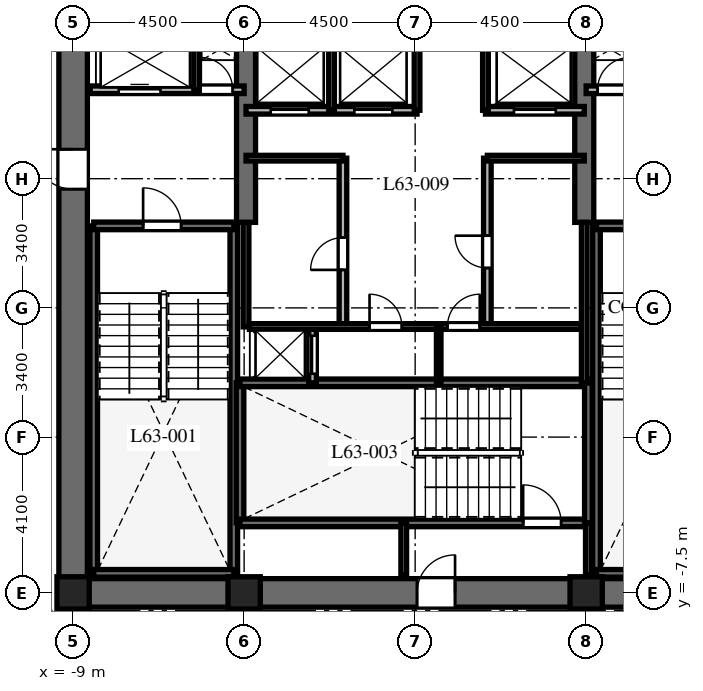
"""IFC4 building model, lengths in metres.
Left out: names, types, materials, properties, quantities, classifications, styles, units other than length and angle.
Written with IfcOpenShell. Run it as: python <this file> out.ifc"""

import sys

from ifc_helpers import new_model, si_unit, direction, frame, frame_2d, origin, origin_2d, place, context, subcontext, project, spatial, rectangle, extrude, element, fill, save


model = new_model("IFC4")
c1 = context("Model", 3, precision=1e-05, world=origin(), true_north=direction((0.0, 1.0)))
c2 = subcontext(c1, "Body", "Model", "MODEL_VIEW")
j1 = project(units=[si_unit("LENGTHUNIT", "METRE"), si_unit("PLANEANGLEUNIT", "RADIAN")], contexts=[c1])
p1 = place(None, origin())
s1 = spatial("IfcSite", under=j1, at=p1, CompositionType="ELEMENT")
p2 = place(p1, origin())
s2 = spatial("IfcBuilding", under=s1, at=p2, CompositionType="ELEMENT")
p3 = place(p2, frame((0.0, 0.0, 252.1)))
s3 = spatial("IfcBuildingStorey", under=s2, at=p3, CompositionType="ELEMENT", Elevation=252.1)
p4 = place(p3, frame((-9.375, -7.5, 0.0), z_axis=(0.0, 0.0, 1.0), x_axis=(1.0, 0.0, 0.0)))
e1 = element("IfcWall", 1, at=p4, inside=s3, PredefinedType="SHEAR", context=c2, shape_type="SweptSolid", body=[
    extrude(rectangle(XDim=18.75, YDim=0.75, at=frame_2d((9.375, 0.0))), origin(), (0.0, 0.0, 1.0), 3.8),
])
p5 = place(p4, frame((9.425, 0.0, 0.0)))
e2 = element("IfcOpeningElement", 2, at=p5, cuts=e1, PredefinedType="OPENING", context=c2, shape_type="SweptSolid", body=[
    extrude(rectangle(XDim=1.0, YDim=2.15, at=frame_2d((0.5, 1.075))), frame((0.0, 0.385, 0.0), z_axis=(0.0, -1.0, 0.0), x_axis=(1.0, 0.0, 0.0)), (0.0, 0.0, 1.0), 0.77),
])
p6 = place(p3, frame((-9.0, -7.125, 0.0), z_axis=(0.0, 0.0, 1.0), x_axis=(0.0, 1.0, 0.0)))
e3 = element("IfcWall", 3, at=p6, inside=s3, PredefinedType="SHEAR", context=c2, shape_type="SweptSolid", body=[
    extrude(rectangle(XDim=14.25, YDim=0.75, at=frame_2d((7.125, 0.0))), origin(), (0.0, 0.0, 1.0), 3.8),
])
p7 = place(p6, frame((10.25, 0.0, 0.0)))
e4 = element("IfcOpeningElement", 4, at=p7, cuts=e3, PredefinedType="OPENING", context=c2, shape_type="SweptSolid", body=[
    extrude(rectangle(XDim=1.05, YDim=2.15, at=frame_2d((0.525, 1.075))), frame((0.0, 0.385, 0.0), z_axis=(0.0, -1.0, 0.0), x_axis=(1.0, 0.0, 0.0)), (0.0, 0.0, 1.0), 0.77),
])
for number, where, z_axis, x_axis in (
    (5, (-4.45, 2.25, 0.0), (0.0, 0.0, 1.0), (0.0, 1.0, 0.0)),
    (6, (4.45, 2.25, 0.0), (0.0, 0.0, 1.0), (0.0, 1.0, 0.0)),
):
    element("IfcWall", number, at=place(p3, frame(where, z_axis=z_axis, x_axis=x_axis)), inside=s3, PredefinedType="SHEAR", context=c2, shape_type="SweptSolid", body=[
        extrude(rectangle(XDim=4.875, YDim=0.5, at=frame_2d((2.438, 0.0))), origin(), (0.0, 0.0, 1.0), 3.8),
    ])
for number, where, z_axis, x_axis in (
    (7, (-8.458, -6.985, 0.0), (0.0, 0.0, 1.0), (0.0, 1.0, 0.0)),
    (8, (-4.772, -6.985, 0.0), (0.0, 0.0, 1.0), (0.0, 1.0, 0.0)),
):
    element("IfcWall", number, at=place(p3, frame(where, z_axis=z_axis, x_axis=x_axis)), inside=s3, PredefinedType="SHEAR", context=c2, shape_type="SweptSolid", body=[
        extrude(rectangle(XDim=9.143, YDim=0.2, at=frame_2d((4.572, 0.0))), origin(), (0.0, 0.0, 1.0), 3.8),
    ])
p8 = place(p3, frame((-8.458, -6.985, 0.0), z_axis=(0.0, 0.0, 1.0), x_axis=(1.0, 0.0, 0.0)))
e9 = element("IfcWall", 9, at=p8, inside=s3, PredefinedType="SHEAR", context=c2, shape_type="SweptSolid", body=[
    extrude(rectangle(XDim=3.686, YDim=0.2, at=frame_2d((1.843, 0.0))), origin(), (0.0, 0.0, 1.0), 3.8),
])
p9 = place(p3, frame((-8.458, 2.158, 0.0), z_axis=(0.0, 0.0, 1.0), x_axis=(1.0, 0.0, 0.0)))
e10 = element("IfcWall", 10, at=p9, inside=s3, PredefinedType="SHEAR", context=c2, shape_type="SweptSolid", body=[
    extrude(rectangle(XDim=3.686, YDim=0.2, at=frame_2d((1.843, 0.0))), origin(), (0.0, 0.0, 1.0), 3.8),
])
p10 = place(p9, frame((1.3, 0.0, 0.0)))
e11 = element("IfcOpeningElement", 11, at=p10, cuts=e10, PredefinedType="OPENING", context=c2, shape_type="SweptSolid", body=[
    extrude(rectangle(XDim=1.0, YDim=2.15, at=frame_2d((0.5, 1.075))), frame((0.0, 0.11, 0.0), z_axis=(0.0, -1.0, 0.0), x_axis=(1.0, 0.0, 0.0)), (0.0, 0.0, 1.0), 0.22),
])
p11 = place(p3, frame((4.772, -6.985, 0.0), z_axis=(0.0, 0.0, 1.0), x_axis=(0.0, 1.0, 0.0)))
e12 = element("IfcWall", 12, at=p11, inside=s3, PredefinedType="SHEAR", context=c2, shape_type="SweptSolid", body=[
    extrude(rectangle(XDim=9.143, YDim=0.2, at=frame_2d((4.572, 0.0))), origin(), (0.0, 0.0, 1.0), 3.8),
])
p12 = place(p3, frame((4.772, -6.985, 0.0), z_axis=(0.0, 0.0, 1.0), x_axis=(1.0, 0.0, 0.0)))
e13 = element("IfcWall", 13, at=p12, inside=s3, PredefinedType="SHEAR", context=c2, shape_type="SweptSolid", body=[
    extrude(rectangle(XDim=3.686, YDim=0.2, at=frame_2d((1.843, 0.0))), origin(), (0.0, 0.0, 1.0), 3.8),
])
p13 = place(p3, frame((4.772, 2.158, 0.0), z_axis=(0.0, 0.0, 1.0), x_axis=(1.0, 0.0, 0.0)))
e14 = element("IfcWall", 14, at=p13, inside=s3, PredefinedType="SHEAR", context=c2, shape_type="SweptSolid", body=[
    extrude(rectangle(XDim=3.686, YDim=0.2, at=frame_2d((1.843, 0.0))), origin(), (0.0, 0.0, 1.0), 3.8),
])
p14 = place(p13, frame((1.35, 0.0, 0.0)))
e15 = element("IfcOpeningElement", 15, at=p14, cuts=e14, PredefinedType="OPENING", context=c2, shape_type="SweptSolid", body=[
    extrude(rectangle(XDim=1.0, YDim=2.15, at=frame_2d((0.5, 1.075))), frame((0.0, 0.11, 0.0), z_axis=(0.0, -1.0, 0.0), x_axis=(1.0, 0.0, 0.0)), (0.0, 0.0, 1.0), 0.22),
])
p15 = place(p3, frame((-4.608, -5.658, 0.0), z_axis=(0.0, 0.0, 1.0), x_axis=(0.0, 1.0, 0.0)))
e16 = element("IfcWall", 16, at=p15, inside=s3, PredefinedType="SHEAR", context=c2, shape_type="SweptSolid", body=[
    extrude(rectangle(XDim=3.686, YDim=0.2, at=frame_2d((1.843, 0.0))), origin(), (0.0, 0.0, 1.0), 3.8),
])
p16 = place(p3, frame((-4.608, -5.658, 0.0), z_axis=(0.0, 0.0, 1.0), x_axis=(1.0, 0.0, 0.0)))
e17 = element("IfcWall", 17, at=p16, inside=s3, PredefinedType="SHEAR", context=c2, shape_type="SweptSolid", body=[
    extrude(rectangle(XDim=9.166, YDim=0.2, at=frame_2d((4.583, 0.0))), origin(), (0.0, 0.0, 1.0), 3.8),
])
p17 = place(p16, frame((7.45, 0.0, 0.0)))
e18 = element("IfcOpeningElement", 18, at=p17, cuts=e17, PredefinedType="OPENING", context=c2, shape_type="SweptSolid", body=[
    extrude(rectangle(XDim=1.0, YDim=2.15, at=frame_2d((0.5, 1.075))), frame((0.0, 0.11, 0.0), z_axis=(0.0, -1.0, 0.0), x_axis=(1.0, 0.0, 0.0)), (0.0, 0.0, 1.0), 0.22),
])
p18 = place(p3, frame((-4.608, -1.972, 0.0), z_axis=(0.0, 0.0, 1.0), x_axis=(1.0, 0.0, 0.0)))
e19 = element("IfcWall", 19, at=p18, inside=s3, PredefinedType="SHEAR", context=c2, shape_type="SweptSolid", body=[
    extrude(rectangle(XDim=9.166, YDim=0.2, at=frame_2d((4.583, 0.0))), origin(), (0.0, 0.0, 1.0), 3.8),
])
p19 = place(p3, frame((4.558, -5.658, 0.0), z_axis=(0.0, 0.0, 1.0), x_axis=(0.0, 1.0, 0.0)))
e20 = element("IfcWall", 20, at=p19, inside=s3, PredefinedType="SHEAR", context=c2, shape_type="SweptSolid", body=[
    extrude(rectangle(XDim=3.686, YDim=0.2, at=frame_2d((1.843, 0.0))), origin(), (0.0, 0.0, 1.0), 3.8),
])
for number, where, z_axis, x_axis in (
    (21, (-9.0, -7.5, 0.0), (0.0, 0.0, 1.0), (1.0, 0.0, 0.0)),
    (22, (-4.5, -7.5, 0.0), (0.0, 0.0, 1.0), (1.0, 0.0, 0.0)),
    (23, (4.5, -7.5, 0.0), (0.0, 0.0, 1.0), (1.0, 0.0, 0.0)),
):
    element("IfcColumn", number, at=place(p3, frame(where, z_axis=z_axis, x_axis=x_axis)), inside=s3, PredefinedType="COLUMN", context=c2, shape_type="SweptSolid", body=[
        extrude(rectangle(XDim=0.85, YDim=0.85, at=origin_2d()), origin(), (0.0, 0.0, 1.0), 3.8),
    ])
for number, where, z_axis, x_axis in (
    (24, (-0.3, -7.02, 0.0), (0.0, 0.0, 1.0), (0.0, 1.0, 0.0)),
    (25, (4.558, -7.02, 0.0), (0.0, 0.0, 1.0), (0.0, 1.0, 0.0)),
):
    element("IfcWall", number, at=place(p3, frame(where, z_axis=z_axis, x_axis=x_axis)), inside=s3, PredefinedType="PARTITIONING", context=c2, shape_type="SweptSolid", body=[
        extrude(rectangle(XDim=1.362, YDim=0.15, at=frame_2d((0.681, 0.0))), origin(), (0.0, 0.0, 1.0), 3.48),
    ])
p20 = place(p3, frame((-8.55, 5.74, 0.0), z_axis=(0.0, 0.0, 1.0), x_axis=(1.0, 0.0, 0.0)))
e26 = element("IfcWall", 26, at=p20, inside=s3, PredefinedType="PARTITIONING", context=c2, shape_type="SweptSolid", body=[
    extrude(rectangle(XDim=4.05, YDim=0.2, at=frame_2d((2.025, 0.0))), origin(), (0.0, 0.0, 1.0), 3.48),
])
p21 = place(p20, frame((0.75, 0.0, 0.0)))
e27 = element("IfcOpeningElement", 27, at=p21, cuts=e26, PredefinedType="OPENING", context=c2, shape_type="SweptSolid", body=[
    extrude(rectangle(XDim=1.1, YDim=2.2, at=frame_2d((0.55, 1.1))), frame((0.0, 0.11, 0.0), z_axis=(0.0, -1.0, 0.0), x_axis=(1.0, 0.0, 0.0)), (0.0, 0.0, 1.0), 0.22),
])
p22 = place(p20, frame((2.9, 0.0, 0.0)))
e28 = element("IfcOpeningElement", 28, at=p22, cuts=e26, PredefinedType="OPENING", context=c2, shape_type="SweptSolid", body=[
    extrude(rectangle(XDim=0.85, YDim=2.03, at=frame_2d((0.425, 1.015))), frame((0.0, 0.11, 0.0), z_axis=(0.0, -1.0, 0.0), x_axis=(1.0, 0.0, 0.0)), (0.0, 0.0, 1.0), 0.22),
])
p23 = place(p3, frame((-5.75, 5.74, 0.0), z_axis=(0.0, 0.0, 1.0), x_axis=(0.0, 1.0, 0.0)))
e29 = element("IfcWall", 29, at=p23, inside=s3, PredefinedType="PARTITIONING", context=c2, shape_type="SweptSolid", body=[
    extrude(rectangle(XDim=1.41, YDim=0.15, at=frame_2d((0.705, 0.0))), origin(), (0.0, 0.0, 1.0), 3.48),
])
p24 = place(p3, frame((4.5, 5.74, 0.0), z_axis=(0.0, 0.0, 1.0), x_axis=(1.0, 0.0, 0.0)))
e30 = element("IfcWall", 30, at=p24, inside=s3, PredefinedType="PARTITIONING", context=c2, shape_type="SweptSolid", body=[
    extrude(rectangle(XDim=4.05, YDim=0.2, at=frame_2d((2.025, 0.0))), origin(), (0.0, 0.0, 1.0), 3.48),
])
p25 = place(p24, frame((0.3, 0.0, 0.0)))
e31 = element("IfcOpeningElement", 31, at=p25, cuts=e30, PredefinedType="OPENING", context=c2, shape_type="SweptSolid", body=[
    extrude(rectangle(XDim=0.85, YDim=2.03, at=frame_2d((0.425, 1.015))), frame((0.0, 0.11, 0.0), z_axis=(0.0, -1.0, 0.0), x_axis=(1.0, 0.0, 0.0)), (0.0, 0.0, 1.0), 0.22),
])
p26 = place(p24, frame((2.15, 0.0, 0.0)))
e32 = element("IfcOpeningElement", 32, at=p26, cuts=e30, PredefinedType="OPENING", context=c2, shape_type="SweptSolid", body=[
    extrude(rectangle(XDim=1.1, YDim=2.2, at=frame_2d((0.55, 1.1))), frame((0.0, 0.11, 0.0), z_axis=(0.0, -1.0, 0.0), x_axis=(1.0, 0.0, 0.0)), (0.0, 0.0, 1.0), 0.22),
])
p27 = place(p3, frame((-2.7, -1.972, 0.0), z_axis=(0.0, 0.0, 1.0), x_axis=(0.0, 1.0, 0.0)))
e33 = element("IfcWall", 33, at=p27, inside=s3, PredefinedType="PARTITIONING", context=c2, shape_type="SweptSolid", body=[
    extrude(rectangle(XDim=1.472, YDim=0.2, at=frame_2d((0.736, 0.0))), origin(), (0.0, 0.0, 1.0), 3.48),
])
p28 = place(p27, frame((0.24, 0.0, 0.0)))
e34 = element("IfcOpeningElement", 34, at=p28, cuts=e33, PredefinedType="OPENING", context=c2, shape_type="SweptSolid", body=[
    extrude(rectangle(XDim=1.0, YDim=2.2, at=frame_2d((0.5, 1.1))), frame((0.0, 0.11, 0.0), z_axis=(0.0, -1.0, 0.0), x_axis=(1.0, 0.0, 0.0)), (0.0, 0.0, 1.0), 0.22),
])
p29 = place(p3, frame((-4.45, 5.2, 0.0), z_axis=(0.0, 0.0, 1.0), x_axis=(1.0, 0.0, 0.0)))
e35 = element("IfcWall", 35, at=p29, inside=s3, PredefinedType="PARTITIONING", context=c2, shape_type="SweptSolid", body=[
    extrude(rectangle(XDim=4.5, YDim=0.2, at=frame_2d((2.25, 0.0))), origin(), (0.0, 0.0, 1.0), 3.48),
])
p30 = place(p29, frame((0.65, 0.0, 0.0)))
e36 = element("IfcOpeningElement", 36, at=p30, cuts=e35, PredefinedType="OPENING", context=c2, shape_type="SweptSolid", body=[
    extrude(rectangle(XDim=1.0, YDim=2.2, at=frame_2d((0.5, 1.1))), frame((0.0, 0.11, 0.0), z_axis=(0.0, -1.0, 0.0), x_axis=(1.0, 0.0, 0.0)), (0.0, 0.0, 1.0), 0.22),
])
p31 = place(p29, frame((2.85, 0.0, 0.0)))
e37 = element("IfcOpeningElement", 37, at=p31, cuts=e35, PredefinedType="OPENING", context=c2, shape_type="SweptSolid", body=[
    extrude(rectangle(XDim=1.0, YDim=2.2, at=frame_2d((0.5, 1.1))), frame((0.0, 0.11, 0.0), z_axis=(0.0, -1.0, 0.0), x_axis=(1.0, 0.0, 0.0)), (0.0, 0.0, 1.0), 0.22),
])
p32 = place(p3, frame((1.85, 5.2, 0.0), z_axis=(0.0, 0.0, 1.0), x_axis=(1.0, 0.0, 0.0)))
e38 = element("IfcWall", 38, at=p32, inside=s3, PredefinedType="PARTITIONING", context=c2, shape_type="SweptSolid", body=[
    extrude(rectangle(XDim=2.6, YDim=0.2, at=frame_2d((1.3, 0.0))), origin(), (0.0, 0.0, 1.0), 3.48),
])
p33 = place(p32, frame((0.75, 0.0, 0.0)))
e39 = element("IfcOpeningElement", 39, at=p33, cuts=e38, PredefinedType="OPENING", context=c2, shape_type="SweptSolid", body=[
    extrude(rectangle(XDim=1.1, YDim=2.2, at=frame_2d((0.55, 1.1))), frame((0.0, 0.11, 0.0), z_axis=(0.0, -1.0, 0.0), x_axis=(1.0, 0.0, 0.0)), (0.0, 0.0, 1.0), 0.22),
])
p34 = place(p3, frame((-2.2, 5.2, 0.0), z_axis=(0.0, 0.0, 1.0), x_axis=(0.0, 1.0, 0.0)))
e40 = element("IfcWall", 40, at=p34, inside=s3, PredefinedType="PARTITIONING", context=c2, shape_type="SweptSolid", body=[
    extrude(rectangle(XDim=1.85, YDim=0.15, at=frame_2d((0.925, 0.0))), origin(), (0.0, 0.0, 1.0), 3.48),
])
for number, where, z_axis, x_axis in (
    (41, (0.05, 5.2, 0.0), (0.0, 0.0, 1.0), (0.0, 1.0, 0.0)),
    (42, (1.85, 5.2, 0.0), (0.0, 0.0, 1.0), (0.0, 1.0, 0.0)),
):
    element("IfcWall", number, at=place(p3, frame(where, z_axis=z_axis, x_axis=x_axis)), inside=s3, PredefinedType="PARTITIONING", context=c2, shape_type="SweptSolid", body=[
        extrude(rectangle(XDim=1.95, YDim=0.15, at=frame_2d((0.975, 0.0))), origin(), (0.0, 0.0, 1.0), 3.48),
    ])
p35 = place(p3, frame((-4.45, -0.5, 0.0), z_axis=(0.0, 0.0, 1.0), x_axis=(0.0, 1.0, 0.0)))
e43 = element("IfcWall", 43, at=p35, inside=s3, PredefinedType="PARTITIONING", context=c2, shape_type="SweptSolid", body=[
    extrude(rectangle(XDim=2.75, YDim=0.15, at=frame_2d((1.375, 0.0))), origin(), (0.0, 0.0, 1.0), 3.48),
])
p36 = place(p3, frame((4.45, -1.972, 0.0), z_axis=(0.0, 0.0, 1.0), x_axis=(0.0, 1.0, 0.0)))
e44 = element("IfcWall", 44, at=p36, inside=s3, PredefinedType="PARTITIONING", context=c2, shape_type="SweptSolid", body=[
    extrude(rectangle(XDim=4.222, YDim=0.15, at=frame_2d((2.111, 0.0))), origin(), (0.0, 0.0, 1.0), 3.48),
])
p37 = place(p3, frame((-1.9, -0.5, 0.0), z_axis=(0.0, 0.0, 1.0), x_axis=(0.0, 1.0, 0.0)))
e45 = element("IfcWall", 45, at=p37, inside=s3, PredefinedType="PARTITIONING", context=c2, shape_type="SweptSolid", body=[
    extrude(rectangle(XDim=4.44, YDim=0.2, at=frame_2d((2.22, 0.0))), origin(), (0.0, 0.0, 1.0), 3.48),
])
p38 = place(p37, frame((1.5, 0.0, 0.0)))
e46 = element("IfcOpeningElement", 46, at=p38, cuts=e45, PredefinedType="OPENING", context=c2, shape_type="SweptSolid", body=[
    extrude(rectangle(XDim=0.85, YDim=2.03, at=frame_2d((0.425, 1.015))), frame((0.0, 0.11, 0.0), z_axis=(0.0, -1.0, 0.0), x_axis=(1.0, 0.0, 0.0)), (0.0, 0.0, 1.0), 0.22),
])
p39 = place(p3, frame((-4.45, 3.94, 0.0), z_axis=(0.0, 0.0, 1.0), x_axis=(1.0, 0.0, 0.0)))
e47 = element("IfcWall", 47, at=p39, inside=s3, PredefinedType="PARTITIONING", context=c2, shape_type="SweptSolid", body=[
    extrude(rectangle(XDim=2.55, YDim=0.15, at=frame_2d((1.275, 0.0))), origin(), (0.0, 0.0, 1.0), 3.48),
])
p40 = place(p3, frame((1.9, -0.5, 0.0), z_axis=(0.0, 0.0, 1.0), x_axis=(0.0, 1.0, 0.0)))
e48 = element("IfcWall", 48, at=p40, inside=s3, PredefinedType="PARTITIONING", context=c2, shape_type="SweptSolid", body=[
    extrude(rectangle(XDim=4.44, YDim=0.2, at=frame_2d((2.22, 0.0))), origin(), (0.0, 0.0, 1.0), 3.48),
])
p41 = place(p40, frame((1.55, 0.0, 0.0)))
e49 = element("IfcOpeningElement", 49, at=p41, cuts=e48, PredefinedType="OPENING", context=c2, shape_type="SweptSolid", body=[
    extrude(rectangle(XDim=0.85, YDim=2.03, at=frame_2d((0.425, 1.015))), frame((0.0, 0.11, 0.0), z_axis=(0.0, -1.0, 0.0), x_axis=(1.0, 0.0, 0.0)), (0.0, 0.0, 1.0), 0.22),
])
p42 = place(p3, frame((1.9, 3.94, 0.0), z_axis=(0.0, 0.0, 1.0), x_axis=(1.0, 0.0, 0.0)))
e50 = element("IfcWall", 50, at=p42, inside=s3, PredefinedType="PARTITIONING", context=c2, shape_type="SweptSolid", body=[
    extrude(rectangle(XDim=2.55, YDim=0.15, at=frame_2d((1.275, 0.0))), origin(), (0.0, 0.0, 1.0), 3.48),
])
p43 = place(p3, frame((-4.36, -0.49, 0.0), z_axis=(0.0, 0.0, 1.0), x_axis=(1.0, 0.0, 0.0)))
e51 = element("IfcWall", 51, at=p43, inside=s3, PredefinedType="PARTITIONING", context=c2, shape_type="SweptSolid", body=[
    extrude(rectangle(XDim=8.72, YDim=0.15, at=frame_2d((4.36, 0.0))), origin(), (0.0, 0.0, 1.0), 3.48),
])
p44 = place(p43, frame((3.16, 0.0, 0.0)))
e52 = element("IfcOpeningElement", 52, at=p44, cuts=e51, PredefinedType="OPENING", context=c2, shape_type="SweptSolid", body=[
    extrude(rectangle(XDim=0.85, YDim=2.03, at=frame_2d((0.425, 1.015))), frame((0.0, 0.085, 0.0), z_axis=(0.0, -1.0, 0.0), x_axis=(1.0, 0.0, 0.0)), (0.0, 0.0, 1.0), 0.17),
])
p45 = place(p43, frame((5.21, 0.0, 0.0)))
e53 = element("IfcOpeningElement", 53, at=p45, cuts=e51, PredefinedType="OPENING", context=c2, shape_type="SweptSolid", body=[
    extrude(rectangle(XDim=0.85, YDim=2.03, at=frame_2d((0.425, 1.015))), frame((0.0, 0.085, 0.0), z_axis=(0.0, -1.0, 0.0), x_axis=(1.0, 0.0, 0.0)), (0.0, 0.0, 1.0), 0.17),
])
p46 = place(p3, frame((0.62, -1.972, 0.0), z_axis=(0.0, 0.0, 1.0), x_axis=(0.0, 1.0, 0.0)))
e54 = element("IfcWall", 54, at=p46, inside=s3, PredefinedType="PARTITIONING", context=c2, shape_type="SweptSolid", body=[
    extrude(rectangle(XDim=1.472, YDim=0.12, at=frame_2d((0.736, 0.0))), origin(), (0.0, 0.0, 1.0), 3.48),
])
p47 = place(p10, origin())
e55 = element("IfcDoor", 55, at=p47, inside=s3, OperationType="SINGLE_SWING_LEFT", PredefinedType="DOOR", context=c2, shape_type="SweptSolid", body=[
    extrude(rectangle(XDim=1.0, YDim=2.15, at=frame_2d((0.5, 1.075))), frame((0.0, 0.025, 0.0), z_axis=(0.0, -1.0, 0.0), x_axis=(1.0, 0.0, 0.0)), (0.0, 0.0, 1.0), 0.05),
])
fill(e11, e55)
p48 = place(p17, origin())
e56 = element("IfcDoor", 56, at=p48, inside=s3, OperationType="SINGLE_SWING_LEFT", PredefinedType="DOOR", context=c2, shape_type="SweptSolid", body=[
    extrude(rectangle(XDim=1.0, YDim=2.15, at=frame_2d((0.5, 1.075))), frame((0.0, 0.025, 0.0), z_axis=(0.0, -1.0, 0.0), x_axis=(1.0, 0.0, 0.0)), (0.0, 0.0, 1.0), 0.05),
])
fill(e18, e56)
p49 = place(p5, origin())
e57 = element("IfcDoor", 57, at=p49, inside=s3, OperationType="SINGLE_SWING_RIGHT", PredefinedType="DOOR", context=c2, shape_type="SweptSolid", body=[
    extrude(rectangle(XDim=1.0, YDim=2.15, at=frame_2d((0.5, 1.075))), frame((0.0, 0.025, 0.0), z_axis=(0.0, -1.0, 0.0), x_axis=(1.0, 0.0, 0.0)), (0.0, 0.0, 1.0), 0.05),
])
fill(e2, e57)
p50 = place(p7, origin())
e58 = element("IfcDoor", 58, at=p50, inside=s3, OperationType="SINGLE_SWING_RIGHT", PredefinedType="DOOR", context=c2, shape_type="SweptSolid", body=[
    extrude(rectangle(XDim=1.05, YDim=2.15, at=frame_2d((0.525, 1.075))), frame((0.0, 0.025, 0.0), z_axis=(0.0, -1.0, 0.0), x_axis=(1.0, 0.0, 0.0)), (0.0, 0.0, 1.0), 0.05),
])
fill(e4, e58)
p51 = place(p21, origin())
e59 = element("IfcDoor", 59, at=p51, inside=s3, OperationType="SLIDING_TO_LEFT", PredefinedType="DOOR", context=c2, shape_type="SweptSolid", body=[
    extrude(rectangle(XDim=1.1, YDim=2.2, at=frame_2d((0.55, 1.1))), frame((0.0, 0.025, 0.0), z_axis=(0.0, -1.0, 0.0), x_axis=(1.0, 0.0, 0.0)), (0.0, 0.0, 1.0), 0.05),
])
fill(e27, e59)
p52 = place(p22, origin())
e60 = element("IfcDoor", 60, at=p52, inside=s3, OperationType="SINGLE_SWING_LEFT", PredefinedType="DOOR", context=c2, shape_type="SweptSolid", body=[
    extrude(rectangle(XDim=0.85, YDim=2.03, at=frame_2d((0.425, 1.015))), frame((0.0, 0.025, 0.0), z_axis=(0.0, -1.0, 0.0), x_axis=(1.0, 0.0, 0.0)), (0.0, 0.0, 1.0), 0.05),
])
fill(e28, e60)
p53 = place(p25, origin())
e61 = element("IfcDoor", 61, at=p53, inside=s3, OperationType="SINGLE_SWING_RIGHT", PredefinedType="DOOR", context=c2, shape_type="SweptSolid", body=[
    extrude(rectangle(XDim=0.85, YDim=2.03, at=frame_2d((0.425, 1.015))), frame((0.0, 0.025, 0.0), z_axis=(0.0, -1.0, 0.0), x_axis=(1.0, 0.0, 0.0)), (0.0, 0.0, 1.0), 0.05),
])
fill(e31, e61)
p54 = place(p28, origin())
e62 = element("IfcDoor", 62, at=p54, inside=s3, OperationType="SLIDING_TO_LEFT", PredefinedType="DOOR", context=c2, shape_type="SweptSolid", body=[
    extrude(rectangle(XDim=1.0, YDim=2.2, at=frame_2d((0.5, 1.1))), frame((0.0, 0.025, 0.0), z_axis=(0.0, -1.0, 0.0), x_axis=(1.0, 0.0, 0.0)), (0.0, 0.0, 1.0), 0.05),
])
fill(e34, e62)
p55 = place(p30, origin())
e63 = element("IfcDoor", 63, at=p55, inside=s3, OperationType="SLIDING_TO_LEFT", PredefinedType="DOOR", context=c2, shape_type="SweptSolid", body=[
    extrude(rectangle(XDim=1.0, YDim=2.2, at=frame_2d((0.5, 1.1))), frame((0.0, 0.025, 0.0), z_axis=(0.0, -1.0, 0.0), x_axis=(1.0, 0.0, 0.0)), (0.0, 0.0, 1.0), 0.05),
])
fill(e36, e63)
p56 = place(p31, origin())
e64 = element("IfcDoor", 64, at=p56, inside=s3, OperationType="SLIDING_TO_RIGHT", PredefinedType="DOOR", context=c2, shape_type="SweptSolid", body=[
    extrude(rectangle(XDim=1.0, YDim=2.2, at=frame_2d((0.5, 1.1))), frame((0.0, 0.025, 0.0), z_axis=(0.0, -1.0, 0.0), x_axis=(1.0, 0.0, 0.0)), (0.0, 0.0, 1.0), 0.05),
])
fill(e37, e64)
p57 = place(p33, origin())
e65 = element("IfcDoor", 65, at=p57, inside=s3, OperationType="SLIDING_TO_RIGHT", PredefinedType="DOOR", context=c2, shape_type="SweptSolid", body=[
    extrude(rectangle(XDim=1.1, YDim=2.2, at=frame_2d((0.55, 1.1))), frame((0.0, 0.025, 0.0), z_axis=(0.0, -1.0, 0.0), x_axis=(1.0, 0.0, 0.0)), (0.0, 0.0, 1.0), 0.05),
])
fill(e39, e65)
p58 = place(p38, origin())
e66 = element("IfcDoor", 66, at=p58, inside=s3, OperationType="SINGLE_SWING_LEFT", PredefinedType="DOOR", context=c2, shape_type="SweptSolid", body=[
    extrude(rectangle(XDim=0.85, YDim=2.03, at=frame_2d((0.425, 1.015))), frame((0.0, 0.025, 0.0), z_axis=(0.0, -1.0, 0.0), x_axis=(1.0, 0.0, 0.0)), (0.0, 0.0, 1.0), 0.05),
])
fill(e46, e66)
p59 = place(p41, origin())
e67 = element("IfcDoor", 67, at=p59, inside=s3, OperationType="SINGLE_SWING_RIGHT", PredefinedType="DOOR", context=c2, shape_type="SweptSolid", body=[
    extrude(rectangle(XDim=0.85, YDim=2.03, at=frame_2d((0.425, 1.015))), frame((0.0, 0.025, 0.0), z_axis=(0.0, -1.0, 0.0), x_axis=(1.0, 0.0, 0.0)), (0.0, 0.0, 1.0), 0.05),
])
fill(e49, e67)
p60 = place(p44, origin())
e68 = element("IfcDoor", 68, at=p60, inside=s3, OperationType="SINGLE_SWING_LEFT", PredefinedType="DOOR", context=c2, shape_type="SweptSolid", body=[
    extrude(rectangle(XDim=0.85, YDim=2.03, at=frame_2d((0.425, 1.015))), frame((0.0, 0.025, 0.0), z_axis=(0.0, -1.0, 0.0), x_axis=(1.0, 0.0, 0.0)), (0.0, 0.0, 1.0), 0.05),
])
fill(e52, e68)
p61 = place(p45, origin())
e69 = element("IfcDoor", 69, at=p61, inside=s3, OperationType="SINGLE_SWING_RIGHT", PredefinedType="DOOR", context=c2, shape_type="SweptSolid", body=[
    extrude(rectangle(XDim=0.85, YDim=2.03, at=frame_2d((0.425, 1.015))), frame((0.0, 0.025, 0.0), z_axis=(0.0, -1.0, 0.0), x_axis=(1.0, 0.0, 0.0)), (0.0, 0.0, 1.0), 0.05),
])
fill(e53, e69)
save(model, sys.argv[1])
